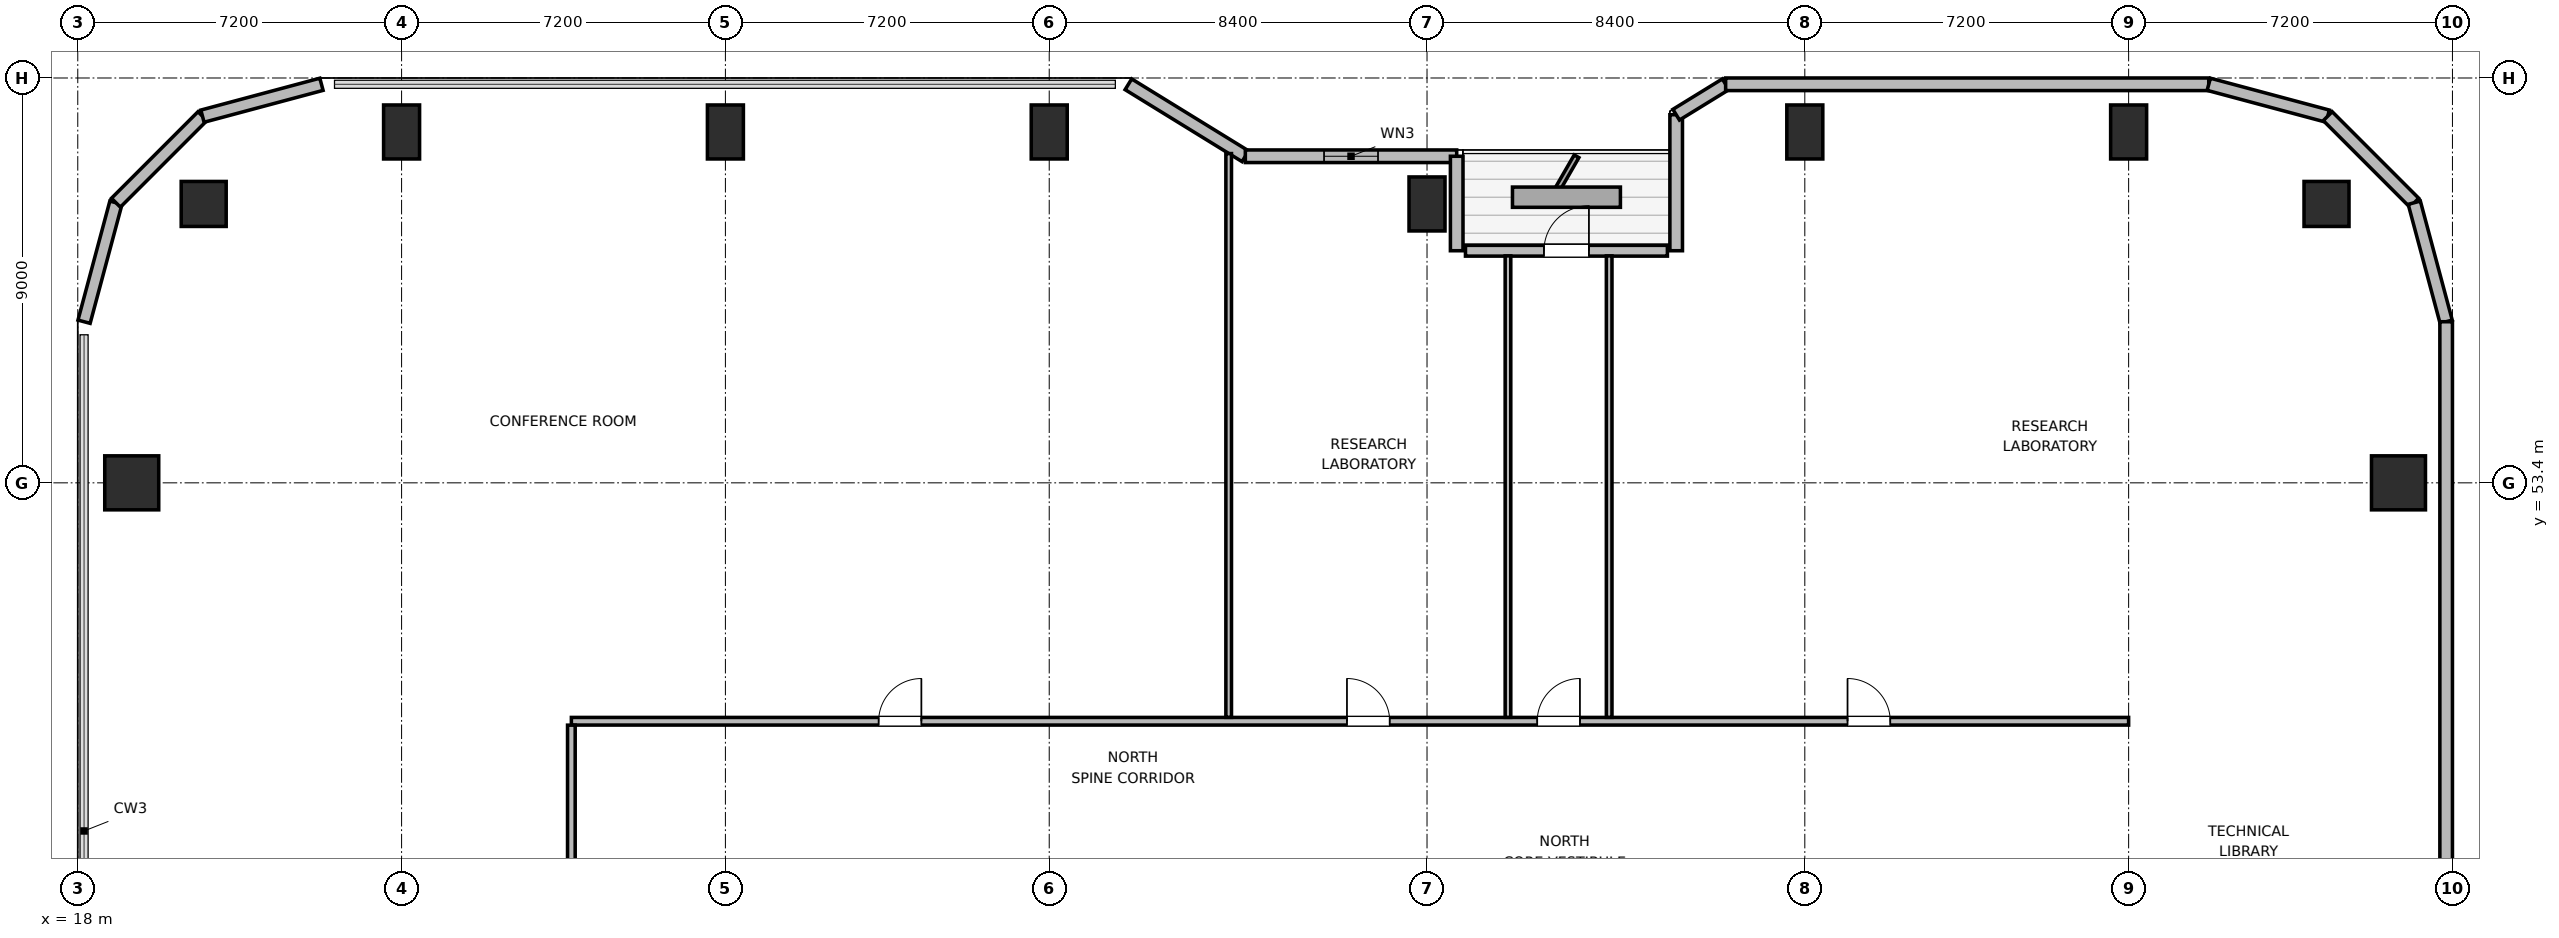
"""IFC4 building model, lengths in metres.
Left out: names, types, materials, properties, quantities, classifications, styles, units other than length and angle.
Written with IfcOpenShell. Run it as: python <this file> out.ifc"""

import sys

from ifc_helpers import new_model, si_unit, direction, frame, frame_2d, origin, origin_2d, place, context, subcontext, project, spatial, rectangle, circle, extrude, element, fill, save


model = new_model("IFC4")
c1 = context("Model", 3, precision=1e-05, world=origin(), true_north=direction((0.0, 1.0)))
c2 = subcontext(c1, "Body", "Model", "MODEL_VIEW")
j1 = project(units=[si_unit("LENGTHUNIT", "METRE"), si_unit("PLANEANGLEUNIT", "RADIAN")], contexts=[c1])
p1 = place(None, origin())
s1 = spatial("IfcSite", under=j1, at=p1, CompositionType="ELEMENT")
p2 = place(p1, origin())
s2 = spatial("IfcBuilding", under=s1, at=p2, CompositionType="ELEMENT")
p3 = place(p2, frame((0.0, 0.0, 205.8)))
s3 = spatial("IfcBuildingStorey", under=s2, at=p3, CompositionType="ELEMENT", Elevation=205.8)
for number, where, z_axis, x_axis in (
    (1, (68.0, 59.6, 0.0), (0.0, 0.0, 1.0), (1.0, 0.0, 0.0)),
    (2, (20.8, 59.6, 0.0), (0.0, 0.0, 1.0), (1.0, 0.0, 0.0)),
):
    element("IfcColumn", number, at=place(p3, frame(where, z_axis=z_axis, x_axis=x_axis)), inside=s3, PredefinedType="COLUMN", context=c2, shape_type="SweptSolid", body=[
        extrude(circle(Radius=0.5, at=origin_2d()), origin(), (0.0, 0.0, 1.0), 3.9),
    ])
for number, where, z_axis, x_axis in (
    (3, (25.2, 61.2, 0.0), (0.0, 0.0, 1.0), (1.0, 0.0, 0.0)),
    (4, (32.4, 61.2, 0.0), (0.0, 0.0, 1.0), (1.0, 0.0, 0.0)),
    (5, (39.6, 61.2, 0.0), (0.0, 0.0, 1.0), (1.0, 0.0, 0.0)),
    (6, (48.0, 59.6, 0.0), (0.0, 0.0, 1.0), (1.0, 0.0, 0.0)),
    (7, (56.4, 61.2, 0.0), (0.0, 0.0, 1.0), (1.0, 0.0, 0.0)),
    (8, (63.6, 61.2, 0.0), (0.0, 0.0, 1.0), (1.0, 0.0, 0.0)),
):
    element("IfcColumn", number, at=place(p3, frame(where, z_axis=z_axis, x_axis=x_axis)), inside=s3, PredefinedType="COLUMN", context=c2, shape_type="SweptSolid", body=[
        extrude(rectangle(XDim=0.8, YDim=1.2, at=origin_2d()), origin(), (0.0, 0.0, 1.0), 3.9),
    ])
for number, where, z_axis, x_axis in (
    (9, (19.2, 53.4, 0.0), (0.0, 0.0, 1.0), (1.0, 0.0, 0.0)),
    (10, (69.6, 53.4, 0.0), (0.0, 0.0, 1.0), (1.0, 0.0, 0.0)),
):
    element("IfcColumn", number, at=place(p3, frame(where, z_axis=z_axis, x_axis=x_axis)), inside=s3, PredefinedType="COLUMN", context=c2, shape_type="SweptSolid", body=[
        extrude(rectangle(XDim=1.2, YDim=1.2, at=origin_2d()), origin(), (0.0, 0.0, 1.0), 3.9),
    ])
p4 = place(p3, frame((18.14, 56.982, 0.0), z_axis=(0.0, 0.0, 1.0), x_axis=(0.258672222976, 0.9659651552, 0.0)))
e11 = element("IfcWall", 11, at=p4, inside=s3, PredefinedType="SOLIDWALL", context=c2, shape_type="SweptSolid", body=[
    extrude(rectangle(XDim=2.739, YDim=0.28, at=frame_2d((1.37, 0.0))), origin(), (0.0, 0.0, 1.0), 3.6),
])
p5 = place(p3, frame((18.848, 59.627, 0.0), z_axis=(0.0, 0.0, 1.0), x_axis=(0.707106781187, 0.707106781187, 0.0)))
e12 = element("IfcWall", 12, at=p5, inside=s3, PredefinedType="SOLIDWALL", context=c2, shape_type="SweptSolid", body=[
    extrude(rectangle(XDim=2.721, YDim=0.28, at=frame_2d((1.36, 0.0))), origin(), (0.0, 0.0, 1.0), 3.6),
])
p6 = place(p3, frame((20.772, 61.552, 0.0), z_axis=(0.0, 0.0, 1.0), x_axis=(0.965971118627, 0.258649952598, 0.0)))
e13 = element("IfcWall", 13, at=p6, inside=s3, PredefinedType="SOLIDWALL", context=c2, shape_type="SweptSolid", body=[
    extrude(rectangle(XDim=2.739, YDim=0.28, at=frame_2d((1.37, 0.0))), origin(), (0.0, 0.0, 1.0), 3.6),
])
p7 = place(p3, frame((41.36, 62.26, 0.0), z_axis=(0.0, 0.0, 1.0), x_axis=(0.851652825334, -0.524106349037, 0.0)))
e14 = element("IfcWall", 14, at=p7, inside=s3, PredefinedType="SOLIDWALL", context=c2, shape_type="SweptSolid", body=[
    extrude(rectangle(XDim=3.053, YDim=0.28, at=frame_2d((1.526, 0.0))), origin(), (0.0, 0.0, 1.0), 2.135),
])
p8 = place(p3, frame((43.96, 60.66, 0.0), z_axis=(0.0, 0.0, 1.0), x_axis=(1.0, 0.0, 0.0)))
e15 = element("IfcWall", 15, at=p8, inside=s3, PredefinedType="SOLIDWALL", context=c2, shape_type="SweptSolid", body=[
    extrude(rectangle(XDim=4.699, YDim=0.28, at=frame_2d((2.35, 0.0))), origin(), (0.0, 0.0, 1.0), 2.135),
])
p9 = place(p8, frame((1.75, 0.0, 0.85)))
e16 = element("IfcOpeningElement", 16, at=p9, cuts=e15, PredefinedType="OPENING", context=c2, shape_type="SweptSolid", body=[
    extrude(rectangle(XDim=1.2, YDim=1.1, at=frame_2d((0.6, 0.55))), frame((0.0, 0.15, 0.0), z_axis=(0.0, -1.0, 0.0), x_axis=(1.0, 0.0, 0.0)), (0.0, 0.0, 1.0), 0.3),
])
p10 = place(p3, frame((48.66, 60.66, 0.0), z_axis=(0.0, 0.0, 1.0), x_axis=(0.0, -1.0, 0.0)))
e17 = element("IfcWall", 17, at=p10, inside=s3, PredefinedType="SOLIDWALL", context=c2, shape_type="SweptSolid", body=[
    extrude(rectangle(XDim=2.1, YDim=0.28, at=frame_2d((1.05, 0.0))), origin(), (0.0, 0.0, 1.0), 2.135),
])
p11 = place(p3, frame((48.855, 58.56, 0.0), z_axis=(0.0, 0.0, 1.0), x_axis=(1.0, 0.0, 0.0)))
e18 = element("IfcWall", 18, at=p11, inside=s3, PredefinedType="SOLIDWALL", context=c2, shape_type="SweptSolid", body=[
    extrude(rectangle(XDim=4.49, YDim=0.24, at=frame_2d((2.245, 0.0))), origin(), (0.0, 0.0, 1.0), 2.185),
])
p12 = place(p11, frame((1.745, 0.0, 0.0)))
e19 = element("IfcOpeningElement", 19, at=p12, cuts=e18, PredefinedType="OPENING", context=c2, shape_type="SweptSolid", body=[
    extrude(rectangle(XDim=1.0, YDim=2.02, at=frame_2d((0.5, 1.01))), frame((0.0, 0.13, 0.0), z_axis=(0.0, -1.0, 0.0), x_axis=(1.0, 0.0, 0.0)), (0.0, 0.0, 1.0), 0.26),
])
p13 = place(p3, frame((53.54, 58.56, 0.0), z_axis=(0.0, 0.0, 1.0), x_axis=(0.0, 1.0, 0.0)))
e20 = element("IfcWall", 20, at=p13, inside=s3, PredefinedType="SOLIDWALL", context=c2, shape_type="SweptSolid", body=[
    extrude(rectangle(XDim=3.024, YDim=0.28, at=frame_2d((1.512, 0.0))), origin(), (0.0, 0.0, 1.0), 2.135),
])
p14 = place(p3, frame((53.54, 61.584, 0.0), z_axis=(0.0, 0.0, 1.0), x_axis=(0.851801140441, 0.523865266212, 0.0)))
e21 = element("IfcWall", 21, at=p14, inside=s3, PredefinedType="SOLIDWALL", context=c2, shape_type="SweptSolid", body=[
    extrude(rectangle(XDim=1.291, YDim=0.28, at=frame_2d((0.646, 0.0))), origin(), (0.0, 0.0, 1.0), 3.6),
])
p15 = place(p3, frame((54.64, 62.26, 0.0), z_axis=(0.0, 0.0, 1.0), x_axis=(1.0, 0.0, 0.0)))
e22 = element("IfcWall", 22, at=p15, inside=s3, PredefinedType="SOLIDWALL", context=c2, shape_type="SweptSolid", body=[
    extrude(rectangle(XDim=10.742, YDim=0.28, at=frame_2d((5.371, 0.0))), origin(), (0.0, 0.0, 1.0), 3.6),
])
p16 = place(p3, frame((65.382, 62.26, 0.0), z_axis=(0.0, 0.0, 1.0), x_axis=(0.965971118627, -0.258649952598, 0.0)))
e23 = element("IfcWall", 23, at=p16, inside=s3, PredefinedType="SOLIDWALL", context=c2, shape_type="SweptSolid", body=[
    extrude(rectangle(XDim=2.739, YDim=0.28, at=frame_2d((1.37, 0.0))), origin(), (0.0, 0.0, 1.0), 3.6),
])
p17 = place(p3, frame((68.028, 61.552, 0.0), z_axis=(0.0, 0.0, 1.0), x_axis=(0.707061915429, -0.707151644098, 0.0)))
e24 = element("IfcWall", 24, at=p17, inside=s3, PredefinedType="SOLIDWALL", context=c2, shape_type="SweptSolid", body=[
    extrude(rectangle(XDim=2.721, YDim=0.28, at=frame_2d((1.36, 0.0))), origin(), (0.0, 0.0, 1.0), 3.6),
])
p18 = place(p3, frame((69.951, 59.627, 0.0), z_axis=(0.0, 0.0, 1.0), x_axis=(0.258672222976, -0.9659651552, 0.0)))
e25 = element("IfcWall", 25, at=p18, inside=s3, PredefinedType="SOLIDWALL", context=c2, shape_type="SweptSolid", body=[
    extrude(rectangle(XDim=2.739, YDim=0.28, at=frame_2d((1.37, 0.0))), origin(), (0.0, 0.0, 1.0), 3.6),
])
p19 = place(p3, frame((70.66, 56.982, 0.0), z_axis=(0.0, 0.0, 1.0), x_axis=(0.0, -1.0, 0.0)))
e26 = element("IfcWall", 26, at=p19, inside=s3, PredefinedType="SOLIDWALL", context=c2, shape_type="SweptSolid", body=[
    extrude(rectangle(XDim=14.242, YDim=0.28, at=frame_2d((7.121, 0.0))), origin(), (0.0, 0.0, 1.0), 3.6),
])
p20 = place(p3, frame((28.975, 48.1, 0.0), z_axis=(0.0, 0.0, 1.0), x_axis=(1.0, 0.0, 0.0)))
e27 = element("IfcWall", 27, at=p20, inside=s3, PredefinedType="PARTITIONING", context=c2, shape_type="SweptSolid", body=[
    extrude(rectangle(XDim=34.625, YDim=0.17, at=frame_2d((17.312, 0.0))), origin(), (0.0, 0.0, 1.0), 3.6),
])
p21 = place(p20, frame((6.832, 0.0, 0.0)))
e28 = element("IfcOpeningElement", 28, at=p21, cuts=e27, PredefinedType="OPENING", context=c2, shape_type="SweptSolid", body=[
    extrude(rectangle(XDim=0.95, YDim=2.04, at=frame_2d((0.475, 1.02))), frame((0.0, 0.095, 0.0), z_axis=(0.0, -1.0, 0.0), x_axis=(1.0, 0.0, 0.0)), (0.0, 0.0, 1.0), 0.19),
])
p22 = place(p20, frame((17.245, 0.0, 0.0)))
e29 = element("IfcOpeningElement", 29, at=p22, cuts=e27, PredefinedType="OPENING", context=c2, shape_type="SweptSolid", body=[
    extrude(rectangle(XDim=0.95, YDim=2.04, at=frame_2d((0.475, 1.02))), frame((0.0, 0.095, 0.0), z_axis=(0.0, -1.0, 0.0), x_axis=(1.0, 0.0, 0.0)), (0.0, 0.0, 1.0), 0.19),
])
p23 = place(p20, frame((21.475, 0.0, 0.0)))
e30 = element("IfcOpeningElement", 30, at=p23, cuts=e27, PredefinedType="OPENING", context=c2, shape_type="SweptSolid", body=[
    extrude(rectangle(XDim=0.95, YDim=2.04, at=frame_2d((0.475, 1.02))), frame((0.0, 0.095, 0.0), z_axis=(0.0, -1.0, 0.0), x_axis=(1.0, 0.0, 0.0)), (0.0, 0.0, 1.0), 0.19),
])
p24 = place(p20, frame((28.375, 0.0, 0.0)))
e31 = element("IfcOpeningElement", 31, at=p24, cuts=e27, PredefinedType="OPENING", context=c2, shape_type="SweptSolid", body=[
    extrude(rectangle(XDim=0.95, YDim=2.04, at=frame_2d((0.475, 1.02))), frame((0.0, 0.095, 0.0), z_axis=(0.0, -1.0, 0.0), x_axis=(1.0, 0.0, 0.0)), (0.0, 0.0, 1.0), 0.19),
])
p25 = place(p3, frame((28.975, 37.1, 0.0), z_axis=(0.0, 0.0, 1.0), x_axis=(0.0, 1.0, 0.0)))
e32 = element("IfcWall", 32, at=p25, inside=s3, PredefinedType="PARTITIONING", context=c2, shape_type="SweptSolid", body=[
    extrude(rectangle(XDim=10.913, YDim=0.17, at=frame_2d((5.457, 0.0))), origin(), (0.0, 0.0, 1.0), 3.6),
])
p26 = place(p25, frame((5.025, 0.0, 0.0)))
e33 = element("IfcOpeningElement", 33, at=p26, cuts=e32, PredefinedType="OPENING", context=c2, shape_type="SweptSolid", body=[
    extrude(rectangle(XDim=0.95, YDim=2.04, at=frame_2d((0.475, 1.02))), frame((0.0, 0.095, 0.0), z_axis=(0.0, -1.0, 0.0), x_axis=(1.0, 0.0, 0.0)), (0.0, 0.0, 1.0), 0.19),
])
p27 = place(p3, frame((43.59, 48.187, 0.0), z_axis=(0.0, 0.0, 1.0), x_axis=(0.0, 1.0, 0.0)))
e34 = element("IfcWall", 34, at=p27, inside=s3, PredefinedType="PARTITIONING", context=c2, shape_type="SweptSolid", body=[
    extrude(rectangle(XDim=12.533, YDim=0.125, at=frame_2d((6.267, 0.0))), origin(), (0.0, 0.0, 1.0), 2.963),
])
p28 = place(p3, frame((49.8, 48.187, 0.0), z_axis=(0.0, 0.0, 1.0), x_axis=(0.0, 1.0, 0.0)))
e35 = element("IfcWall", 35, at=p28, inside=s3, PredefinedType="PARTITIONING", context=c2, shape_type="SweptSolid", body=[
    extrude(rectangle(XDim=10.258, YDim=0.125, at=frame_2d((5.129, 0.0))), origin(), (0.0, 0.0, 1.0), 3.6),
])
p29 = place(p3, frame((52.05, 48.187, 0.0), z_axis=(0.0, 0.0, 1.0), x_axis=(0.0, 1.0, 0.0)))
e36 = element("IfcWall", 36, at=p29, inside=s3, PredefinedType="PARTITIONING", context=c2, shape_type="SweptSolid", body=[
    extrude(rectangle(XDim=10.258, YDim=0.125, at=frame_2d((5.129, 0.0))), origin(), (0.0, 0.0, 1.0), 2.963),
])
p30 = place(p9, origin())
e37 = element("IfcWindow", 37, at=p30, inside=s3, PartitioningType="SINGLE_PANEL", PredefinedType="WINDOW", context=c2, shape_type="SweptSolid", body=[
    extrude(rectangle(XDim=1.2, YDim=1.1, at=frame_2d((0.6, 0.55))), frame((0.0, 0.03, 0.0), z_axis=(0.0, -1.0, 0.0), x_axis=(1.0, 0.0, 0.0)), (0.0, 0.0, 1.0), 0.06),
])
fill(e16, e37)
p31 = place(p12, origin())
e38 = element("IfcDoor", 38, at=p31, inside=s3, OperationType="SINGLE_SWING_RIGHT", PredefinedType="DOOR", context=c2, shape_type="SweptSolid", body=[
    extrude(rectangle(XDim=1.0, YDim=2.02, at=frame_2d((0.5, 1.01))), frame((0.0, 0.025, 0.0), z_axis=(0.0, -1.0, 0.0), x_axis=(1.0, 0.0, 0.0)), (0.0, 0.0, 1.0), 0.05),
])
fill(e19, e38)
p32 = place(p21, origin())
e39 = element("IfcDoor", 39, at=p32, inside=s3, OperationType="SINGLE_SWING_RIGHT", PredefinedType="DOOR", context=c2, shape_type="SweptSolid", body=[
    extrude(rectangle(XDim=0.95, YDim=2.04, at=frame_2d((0.475, 1.02))), frame((0.0, 0.025, 0.0), z_axis=(0.0, -1.0, 0.0), x_axis=(1.0, 0.0, 0.0)), (0.0, 0.0, 1.0), 0.05),
])
fill(e28, e39)
p33 = place(p22, origin())
e40 = element("IfcDoor", 40, at=p33, inside=s3, OperationType="SINGLE_SWING_LEFT", PredefinedType="DOOR", context=c2, shape_type="SweptSolid", body=[
    extrude(rectangle(XDim=0.95, YDim=2.04, at=frame_2d((0.475, 1.02))), frame((0.0, 0.025, 0.0), z_axis=(0.0, -1.0, 0.0), x_axis=(1.0, 0.0, 0.0)), (0.0, 0.0, 1.0), 0.05),
])
fill(e29, e40)
p34 = place(p23, origin())
e41 = element("IfcDoor", 41, at=p34, inside=s3, OperationType="SINGLE_SWING_RIGHT", PredefinedType="DOOR", context=c2, shape_type="SweptSolid", body=[
    extrude(rectangle(XDim=0.95, YDim=2.04, at=frame_2d((0.475, 1.02))), frame((0.0, 0.025, 0.0), z_axis=(0.0, -1.0, 0.0), x_axis=(1.0, 0.0, 0.0)), (0.0, 0.0, 1.0), 0.05),
])
fill(e30, e41)
p35 = place(p24, origin())
e42 = element("IfcDoor", 42, at=p35, inside=s3, OperationType="SINGLE_SWING_LEFT", PredefinedType="DOOR", context=c2, shape_type="SweptSolid", body=[
    extrude(rectangle(XDim=0.95, YDim=2.04, at=frame_2d((0.475, 1.02))), frame((0.0, 0.025, 0.0), z_axis=(0.0, -1.0, 0.0), x_axis=(1.0, 0.0, 0.0)), (0.0, 0.0, 1.0), 0.05),
])
fill(e31, e42)
save(model, sys.argv[1])
